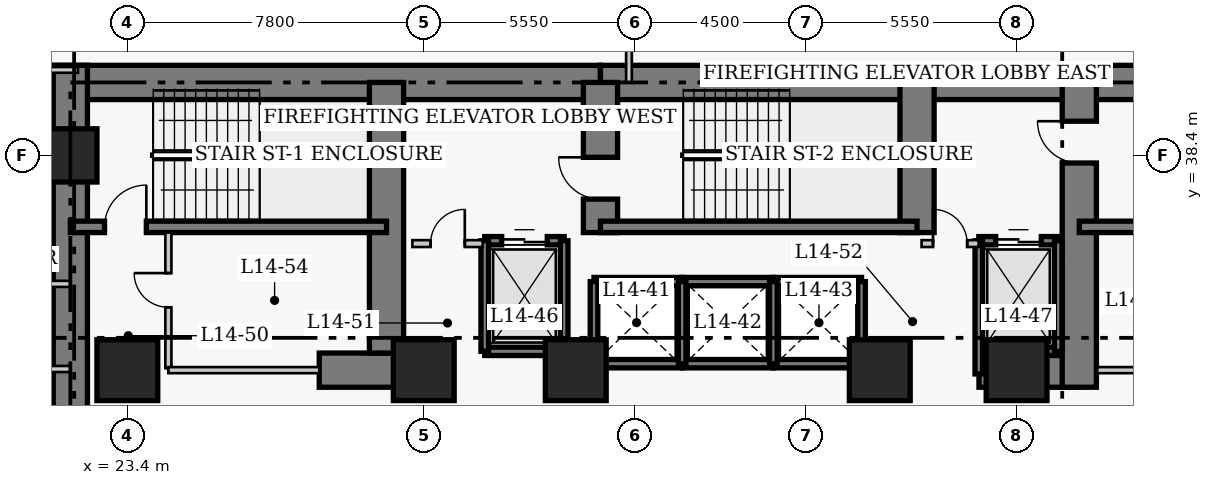
"""IFC4 building model, lengths in metres.
Left out: names, types, materials, properties, quantities, classifications, styles, units other than length and angle.
Written with IfcOpenShell. Run it as: python <this file> out.ifc"""

import sys

from ifc_helpers import new_model, si_unit, direction, frame, frame_2d, origin, origin_2d, place, context, subcontext, project, spatial, rectangle, extrude, element, fill, save


model = new_model("IFC4")
c1 = context("Model", 3, precision=1e-05, world=origin(), true_north=direction((0.0, 1.0)))
c2 = subcontext(c1, "Body", "Model", "MODEL_VIEW")
j1 = project(units=[si_unit("LENGTHUNIT", "METRE"), si_unit("PLANEANGLEUNIT", "RADIAN")], contexts=[c1])
p1 = place(None, origin())
s1 = spatial("IfcSite", under=j1, at=p1, CompositionType="ELEMENT")
p2 = place(p1, origin())
s2 = spatial("IfcBuilding", under=s1, at=p2, CompositionType="ELEMENT")
p3 = place(p2, frame((0.0, 0.0, 60.2)))
s3 = spatial("IfcBuildingStorey", under=s2, at=p3, CompositionType="ELEMENT", Elevation=60.2)
p4 = place(p3, frame((21.45, 40.32, 0.0), z_axis=(0.0, 0.0, 1.0), x_axis=(1.0, 0.0, 0.0)))
e1 = element("IfcWall", 1, at=p4, inside=s3, PredefinedType="SHEAR", context=c2, shape_type="SweptSolid", body=[
    extrude(rectangle(XDim=14.4, YDim=0.9, at=frame_2d((7.2, 0.0))), origin(), (0.0, 0.0, 1.0), 3.8),
])
p5 = place(p3, frame((35.85, 40.32, 0.0), z_axis=(0.0, 0.0, 1.0), x_axis=(1.0, 0.0, 0.0)))
e2 = element("IfcWall", 2, at=p5, inside=s3, PredefinedType="SHEAR", context=c2, shape_type="SweptSolid", body=[
    extrude(rectangle(XDim=12.6, YDim=0.9, at=frame_2d((6.3, 0.0))), origin(), (0.0, 0.0, 1.0), 3.8),
])
p6 = place(p3, frame((48.45, 40.32, 0.0), z_axis=(0.0, 0.0, 1.0), x_axis=(1.0, 0.0, 0.0)))
e3 = element("IfcWall", 3, at=p6, inside=s3, PredefinedType="SHEAR", context=c2, shape_type="SweptSolid", body=[
    extrude(rectangle(XDim=8.97, YDim=0.9, at=frame_2d((4.485, 0.0))), origin(), (0.0, 0.0, 1.0), 3.8),
])
p7 = place(p3, frame((21.9, 27.05, 0.0), z_axis=(0.0, 0.0, 1.0), x_axis=(0.0, 1.0, 0.0)))
e4 = element("IfcWall", 4, at=p7, inside=s3, PredefinedType="SHEAR", context=c2, shape_type="SweptSolid", body=[
    extrude(rectangle(XDim=13.72, YDim=0.9, at=frame_2d((6.86, 0.0))), origin(), (0.0, 0.0, 1.0), 3.8),
])
p8 = place(p3, frame((28.45, 32.75, 0.0), z_axis=(0.0, 0.0, 1.0), x_axis=(1.0, 0.0, 0.0)))
e5 = element("IfcWall", 5, at=p8, inside=s3, PredefinedType="SHEAR", context=c2, shape_type="SweptSolid", body=[
    extrude(rectangle(XDim=2.4, YDim=0.9, at=frame_2d((1.2, 0.0))), origin(), (0.0, 0.0, 1.0), 3.8),
])
p9 = place(p3, frame((45.81, 32.75, 0.0), z_axis=(0.0, 0.0, 1.0), x_axis=(1.0, 0.0, 0.0)))
e6 = element("IfcWall", 6, at=p9, inside=s3, PredefinedType="SHEAR", context=c2, shape_type="SweptSolid", body=[
    extrude(rectangle(XDim=2.64, YDim=0.9, at=frame_2d((1.32, 0.0))), origin(), (0.0, 0.0, 1.0), 3.8),
])
p10 = place(p3, frame((30.22, 33.2, 0.0), z_axis=(0.0, 0.0, 1.0), x_axis=(0.0, 1.0, 0.0)))
e7 = element("IfcWall", 7, at=p10, inside=s3, PredefinedType="SHEAR", context=c2, shape_type="SweptSolid", body=[
    extrude(rectangle(XDim=7.12, YDim=0.9, at=frame_2d((3.56, 0.0))), origin(), (0.0, 0.0, 1.0), 3.8),
])
p11 = place(p3, frame((35.85, 36.37, 0.0), z_axis=(0.0, 0.0, 1.0), x_axis=(0.0, 1.0, 0.0)))
e8 = element("IfcWall", 8, at=p11, inside=s3, PredefinedType="SHEAR", context=c2, shape_type="SweptSolid", body=[
    extrude(rectangle(XDim=3.95, YDim=0.9, at=frame_2d((1.975, 0.0))), origin(), (0.0, 0.0, 1.0), 3.8),
])
p12 = place(p11, frame((0.88, 0.0, 0.0)))
e9 = element("IfcOpeningElement", 9, at=p12, cuts=e8, PredefinedType="OPENING", context=c2, shape_type="SweptSolid", body=[
    extrude(rectangle(XDim=1.1, YDim=2.15, at=frame_2d((0.55, 1.075))), frame((0.0, 0.46, 0.0), z_axis=(0.0, -1.0, 0.0), x_axis=(1.0, 0.0, 0.0)), (0.0, 0.0, 1.0), 0.92),
])
p13 = place(p3, frame((44.18, 36.37, 0.0), z_axis=(0.0, 0.0, 1.0), x_axis=(0.0, 1.0, 0.0)))
e10 = element("IfcWall", 10, at=p13, inside=s3, PredefinedType="SHEAR", context=c2, shape_type="SweptSolid", body=[
    extrude(rectangle(XDim=3.95, YDim=0.9, at=frame_2d((1.975, 0.0))), origin(), (0.0, 0.0, 1.0), 3.8),
])
p14 = place(p3, frame((48.45, 32.3, 0.0), z_axis=(0.0, 0.0, 1.0), x_axis=(0.0, 1.0, 0.0)))
e11 = element("IfcWall", 11, at=p14, inside=s3, PredefinedType="SHEAR", context=c2, shape_type="SweptSolid", body=[
    extrude(rectangle(XDim=8.02, YDim=0.9, at=frame_2d((4.01, 0.0))), origin(), (0.0, 0.0, 1.0), 3.8),
])
p15 = place(p14, frame((5.9, 0.0, 0.0)))
e12 = element("IfcOpeningElement", 12, at=p15, cuts=e11, PredefinedType="OPENING", context=c2, shape_type="SweptSolid", body=[
    extrude(rectangle(XDim=1.1, YDim=2.15, at=frame_2d((0.55, 1.075))), frame((0.0, 0.46, 0.0), z_axis=(0.0, -1.0, 0.0), x_axis=(1.0, 0.0, 0.0)), (0.0, 0.0, 1.0), 0.92),
])
p16 = place(p3, frame((21.9, 36.52, 0.0), z_axis=(0.0, 0.0, 1.0), x_axis=(1.0, 0.0, 0.0)))
e13 = element("IfcWall", 13, at=p16, inside=s3, PredefinedType="SHEAR", context=c2, shape_type="SweptSolid", body=[
    extrude(rectangle(XDim=8.32, YDim=0.3, at=frame_2d((4.16, 0.0))), origin(), (0.0, 0.0, 1.0), 3.8),
])
p17 = place(p16, frame((0.9, 0.0, 0.0)))
e14 = element("IfcOpeningElement", 14, at=p17, cuts=e13, PredefinedType="OPENING", context=c2, shape_type="SweptSolid", body=[
    extrude(rectangle(XDim=1.1, YDim=2.15, at=frame_2d((0.55, 1.075))), frame((0.0, 0.16, 0.0), z_axis=(0.0, -1.0, 0.0), x_axis=(1.0, 0.0, 0.0)), (0.0, 0.0, 1.0), 0.32),
])
p18 = place(p3, frame((35.85, 36.52, 0.0), z_axis=(0.0, 0.0, 1.0), x_axis=(1.0, 0.0, 0.0)))
e15 = element("IfcWall", 15, at=p18, inside=s3, PredefinedType="SHEAR", context=c2, shape_type="SweptSolid", body=[
    extrude(rectangle(XDim=8.33, YDim=0.3, at=frame_2d((4.165, 0.0))), origin(), (0.0, 0.0, 1.0), 3.8),
])
p19 = place(p3, frame((48.45, 36.52, 0.0), z_axis=(0.0, 0.0, 1.0), x_axis=(1.0, 0.0, 0.0)))
e16 = element("IfcWall", 16, at=p19, inside=s3, PredefinedType="SHEAR", context=c2, shape_type="SweptSolid", body=[
    extrude(rectangle(XDim=8.52, YDim=0.3, at=frame_2d((4.26, 0.0))), origin(), (0.0, 0.0, 1.0), 3.8),
])
p20 = place(p3, frame((21.9, 38.4, 0.0), z_axis=(0.0, 0.0, 1.0), x_axis=(1.0, 0.0, 0.0)))
e17 = element("IfcColumn", 17, at=p20, inside=s3, PredefinedType="COLUMN", context=c2, shape_type="SweptSolid", body=[
    extrude(rectangle(XDim=1.4, YDim=1.4, at=origin_2d()), origin(), (0.0, 0.0, 1.0), 3.8),
])
for number, where, z_axis, x_axis in (
    (18, (23.4, 32.75, 0.0), (0.0, 0.0, 1.0), (1.0, 0.0, 0.0)),
    (19, (31.2, 32.75, 0.0), (0.0, 0.0, 1.0), (1.0, 0.0, 0.0)),
    (20, (35.2, 32.75, 0.0), (0.0, 0.0, 1.0), (1.0, 0.0, 0.0)),
    (21, (43.2, 32.75, 0.0), (0.0, 0.0, 1.0), (1.0, 0.0, 0.0)),
    (22, (46.8, 32.75, 0.0), (0.0, 0.0, 1.0), (1.0, 0.0, 0.0)),
):
    element("IfcColumn", number, at=place(p3, frame(where, z_axis=z_axis, x_axis=x_axis)), inside=s3, PredefinedType="COLUMN", context=c2, shape_type="SweptSolid", body=[
        extrude(rectangle(XDim=1.6, YDim=1.6, at=origin_2d()), origin(), (0.0, 0.0, 1.0), 3.8),
    ])
for number, where, z_axis, x_axis in (
    (23, (35.68, 35.08, 0.0), (0.0, 0.0, 1.0), (1.0, 0.0, 0.0)),
    (24, (35.68, 32.92, 0.0), (0.0, 0.0, 1.0), (1.0, 0.0, 0.0)),
):
    element("IfcWall", number, at=place(p3, frame(where, z_axis=z_axis, x_axis=x_axis)), inside=s3, PredefinedType="SHEAR", context=c2, shape_type="SweptSolid", body=[
        extrude(rectangle(XDim=2.32, YDim=0.22, at=frame_2d((1.16, 0.0))), origin(), (0.0, 0.0, 1.0), 3.8),
    ])
p21 = place(p3, frame((35.68, 32.92, 0.0), z_axis=(0.0, 0.0, 1.0), x_axis=(0.0, 1.0, 0.0)))
e25 = element("IfcWall", 25, at=p21, inside=s3, PredefinedType="SHEAR", context=c2, shape_type="SweptSolid", body=[
    extrude(rectangle(XDim=2.16, YDim=0.2, at=frame_2d((1.08, 0.0))), origin(), (0.0, 0.0, 1.0), 3.8),
])
for number, where, z_axis, x_axis in (
    (26, (38.0, 35.08, 0.0), (0.0, 0.0, 1.0), (1.0, 0.0, 0.0)),
    (27, (38.0, 32.92, 0.0), (0.0, 0.0, 1.0), (1.0, 0.0, 0.0)),
):
    element("IfcWall", number, at=place(p3, frame(where, z_axis=z_axis, x_axis=x_axis)), inside=s3, PredefinedType="SHEAR", context=c2, shape_type="SweptSolid", body=[
        extrude(rectangle(XDim=2.4, YDim=0.22, at=frame_2d((1.2, 0.0))), origin(), (0.0, 0.0, 1.0), 3.8),
    ])
p22 = place(p3, frame((38.0, 32.92, 0.0), z_axis=(0.0, 0.0, 1.0), x_axis=(0.0, 1.0, 0.0)))
e28 = element("IfcWall", 28, at=p22, inside=s3, PredefinedType="SHEAR", context=c2, shape_type="SweptSolid", body=[
    extrude(rectangle(XDim=2.16, YDim=0.2, at=frame_2d((1.08, 0.0))), origin(), (0.0, 0.0, 1.0), 3.8),
])
for number, where, z_axis, x_axis in (
    (29, (40.4, 35.08, 0.0), (0.0, 0.0, 1.0), (1.0, 0.0, 0.0)),
    (30, (40.4, 32.92, 0.0), (0.0, 0.0, 1.0), (1.0, 0.0, 0.0)),
):
    element("IfcWall", number, at=place(p3, frame(where, z_axis=z_axis, x_axis=x_axis)), inside=s3, PredefinedType="SHEAR", context=c2, shape_type="SweptSolid", body=[
        extrude(rectangle(XDim=2.32, YDim=0.22, at=frame_2d((1.16, 0.0))), origin(), (0.0, 0.0, 1.0), 3.8),
    ])
for number, where, z_axis, x_axis in (
    (31, (40.4, 32.92, 0.0), (0.0, 0.0, 1.0), (0.0, 1.0, 0.0)),
    (32, (42.72, 32.92, 0.0), (0.0, 0.0, 1.0), (0.0, 1.0, 0.0)),
):
    element("IfcWall", number, at=place(p3, frame(where, z_axis=z_axis, x_axis=x_axis)), inside=s3, PredefinedType="SHEAR", context=c2, shape_type="SweptSolid", body=[
        extrude(rectangle(XDim=2.16, YDim=0.2, at=frame_2d((1.08, 0.0))), origin(), (0.0, 0.0, 1.0), 3.8),
    ])
p23 = place(p3, frame((32.805, 36.155, 0.0), z_axis=(0.0, 0.0, 1.0), x_axis=(1.0, 0.0, 0.0)))
e33 = element("IfcWall", 33, at=p23, inside=s3, PredefinedType="SHEAR", context=c2, shape_type="SweptSolid", body=[
    extrude(rectangle(XDim=2.09, YDim=0.22, at=frame_2d((1.045, 0.0))), origin(), (0.0, 0.0, 1.0), 3.8),
])
p24 = place(p23, frame((0.445, 0.0, 0.0)))
e34 = element("IfcOpeningElement", 34, at=p24, cuts=e33, PredefinedType="OPENING", context=c2, shape_type="SweptSolid", body=[
    extrude(rectangle(XDim=1.2, YDim=2.15, at=frame_2d((0.6, 1.075))), frame((0.0, 0.12, 0.0), z_axis=(0.0, -1.0, 0.0), x_axis=(1.0, 0.0, 0.0)), (0.0, 0.0, 1.0), 0.24),
])
p25 = place(p3, frame((32.805, 33.245, 0.0), z_axis=(0.0, 0.0, 1.0), x_axis=(1.0, 0.0, 0.0)))
e35 = element("IfcWall", 35, at=p25, inside=s3, PredefinedType="SHEAR", context=c2, shape_type="SweptSolid", body=[
    extrude(rectangle(XDim=2.09, YDim=0.22, at=frame_2d((1.045, 0.0))), origin(), (0.0, 0.0, 1.0), 3.8),
])
for number, where, z_axis, x_axis in (
    (36, (32.805, 33.245, 0.0), (0.0, 0.0, 1.0), (0.0, 1.0, 0.0)),
    (37, (34.895, 33.245, 0.0), (0.0, 0.0, 1.0), (0.0, 1.0, 0.0)),
):
    element("IfcWall", number, at=place(p3, frame(where, z_axis=z_axis, x_axis=x_axis)), inside=s3, PredefinedType="SHEAR", context=c2, shape_type="SweptSolid", body=[
        extrude(rectangle(XDim=2.91, YDim=0.2, at=frame_2d((1.455, 0.0))), origin(), (0.0, 0.0, 1.0), 3.8),
    ])
p26 = place(p3, frame((45.805, 36.155, 0.0), z_axis=(0.0, 0.0, 1.0), x_axis=(1.0, 0.0, 0.0)))
e38 = element("IfcWall", 38, at=p26, inside=s3, PredefinedType="SHEAR", context=c2, shape_type="SweptSolid", body=[
    extrude(rectangle(XDim=2.09, YDim=0.22, at=frame_2d((1.045, 0.0))), origin(), (0.0, 0.0, 1.0), 3.8),
])
p27 = place(p26, frame((0.445, 0.0, 0.0)))
e39 = element("IfcOpeningElement", 39, at=p27, cuts=e38, PredefinedType="OPENING", context=c2, shape_type="SweptSolid", body=[
    extrude(rectangle(XDim=1.2, YDim=2.15, at=frame_2d((0.6, 1.075))), frame((0.0, 0.12, 0.0), z_axis=(0.0, -1.0, 0.0), x_axis=(1.0, 0.0, 0.0)), (0.0, 0.0, 1.0), 0.24),
])
p28 = place(p3, frame((45.805, 33.245, 0.0), z_axis=(0.0, 0.0, 1.0), x_axis=(1.0, 0.0, 0.0)))
e40 = element("IfcWall", 40, at=p28, inside=s3, PredefinedType="SHEAR", context=c2, shape_type="SweptSolid", body=[
    extrude(rectangle(XDim=2.09, YDim=0.22, at=frame_2d((1.045, 0.0))), origin(), (0.0, 0.0, 1.0), 3.8),
])
p29 = place(p3, frame((45.805, 32.65, 0.0), z_axis=(0.0, 0.0, 1.0), x_axis=(0.0, 1.0, 0.0)))
e41 = element("IfcWall", 41, at=p29, inside=s3, PredefinedType="SHEAR", context=c2, shape_type="SweptSolid", body=[
    extrude(rectangle(XDim=3.505, YDim=0.2, at=frame_2d((1.752, 0.0))), origin(), (0.0, 0.0, 1.0), 3.8),
])
p30 = place(p3, frame((47.895, 33.245, 0.0), z_axis=(0.0, 0.0, 1.0), x_axis=(0.0, 1.0, 0.0)))
e42 = element("IfcWall", 42, at=p30, inside=s3, PredefinedType="SHEAR", context=c2, shape_type="SweptSolid", body=[
    extrude(rectangle(XDim=2.91, YDim=0.2, at=frame_2d((1.455, 0.0))), origin(), (0.0, 0.0, 1.0), 3.8),
])
p31 = place(p3, frame((30.9, 36.08, 0.0), z_axis=(0.0, 0.0, 1.0), x_axis=(1.0, 0.0, 0.0)))
e43 = element("IfcWall", 43, at=p31, inside=s3, PredefinedType="PARTITIONING", context=c2, shape_type="SweptSolid", body=[
    extrude(rectangle(XDim=1.85, YDim=0.18, at=frame_2d((0.925, 0.0))), origin(), (0.0, 0.0, 1.0), 3.54),
])
p32 = place(p31, frame((0.48, 0.0, 0.0)))
e44 = element("IfcOpeningElement", 44, at=p32, cuts=e43, PredefinedType="OPENING", context=c2, shape_type="SweptSolid", body=[
    extrude(rectangle(XDim=0.9, YDim=2.15, at=frame_2d((0.45, 1.075))), frame((0.0, 0.1, 0.0), z_axis=(0.0, -1.0, 0.0), x_axis=(1.0, 0.0, 0.0)), (0.0, 0.0, 1.0), 0.2),
])
p33 = place(p3, frame((44.3, 36.08, 0.0), z_axis=(0.0, 0.0, 1.0), x_axis=(1.0, 0.0, 0.0)))
e45 = element("IfcWall", 45, at=p33, inside=s3, PredefinedType="PARTITIONING", context=c2, shape_type="SweptSolid", body=[
    extrude(rectangle(XDim=1.5, YDim=0.18, at=frame_2d((0.75, 0.0))), origin(), (0.0, 0.0, 1.0), 3.54),
])
p34 = place(p33, frame((0.3, 0.0, 0.0)))
e46 = element("IfcOpeningElement", 46, at=p34, cuts=e45, PredefinedType="OPENING", context=c2, shape_type="SweptSolid", body=[
    extrude(rectangle(XDim=0.9, YDim=2.15, at=frame_2d((0.45, 1.075))), frame((0.0, 0.1, 0.0), z_axis=(0.0, -1.0, 0.0), x_axis=(1.0, 0.0, 0.0)), (0.0, 0.0, 1.0), 0.2),
])
p35 = place(p3, frame((24.48, 32.8, 0.0), z_axis=(0.0, 0.0, 1.0), x_axis=(0.0, 1.0, 0.0)))
e47 = element("IfcWall", 47, at=p35, inside=s3, PredefinedType="PARTITIONING", context=c2, shape_type="SweptSolid", body=[
    extrude(rectangle(XDim=3.57, YDim=0.16, at=frame_2d((1.785, 0.0))), origin(), (0.0, 0.0, 1.0), 3.54),
])
p36 = place(p35, frame((1.604, 0.0, 0.0)))
e48 = element("IfcOpeningElement", 48, at=p36, cuts=e47, PredefinedType="OPENING", context=c2, shape_type="SweptSolid", body=[
    extrude(rectangle(XDim=0.9, YDim=2.1, at=frame_2d((0.45, 1.05))), frame((0.0, 0.09, 0.0), z_axis=(0.0, -1.0, 0.0), x_axis=(1.0, 0.0, 0.0)), (0.0, 0.0, 1.0), 0.18),
])
p37 = place(p3, frame((24.48, 32.75, 0.0), z_axis=(0.0, 0.0, 1.0), x_axis=(1.0, 0.0, 0.0)))
e49 = element("IfcWall", 49, at=p37, inside=s3, PredefinedType="PARTITIONING", context=c2, shape_type="SweptSolid", body=[
    extrude(rectangle(XDim=3.97, YDim=0.16, at=frame_2d((1.985, 0.0))), origin(), (0.0, 0.0, 1.0), 3.54),
])
p38 = place(p3, frame((48.92, 32.75, 0.0), z_axis=(0.0, 0.0, 1.0), x_axis=(1.0, 0.0, 0.0)))
e50 = element("IfcWall", 50, at=p38, inside=s3, PredefinedType="PARTITIONING", context=c2, shape_type="SweptSolid", body=[
    extrude(rectangle(XDim=2.2, YDim=0.16, at=frame_2d((1.1, 0.0))), origin(), (0.0, 0.0, 1.0), 3.54),
])
for number, where, z_axis, x_axis in (
    (51, (20.46, 35.02, 0.0), (0.0, 0.0, 1.0), (1.0, 0.0, 0.0)),
    (52, (20.46, 32.78, 0.0), (0.0, 0.0, 1.0), (1.0, 0.0, 0.0)),
):
    element("IfcWall", number, at=place(p3, frame(where, z_axis=z_axis, x_axis=x_axis)), inside=s3, PredefinedType="PARTITIONING", context=c2, shape_type="SweptSolid", body=[
        extrude(rectangle(XDim=1.44, YDim=0.16, at=frame_2d((0.72, 0.0))), origin(), (0.0, 0.0, 1.0), 3.54),
    ])
p39 = place(p3, frame((18.24, 40.65, 0.0), z_axis=(0.0, 0.0, 1.0), x_axis=(1.0, 0.0, 0.0)))
e53 = element("IfcWall", 53, at=p39, inside=s3, PredefinedType="PARTITIONING", context=c2, shape_type="SweptSolid", body=[
    extrude(rectangle(XDim=3.86, YDim=0.15, at=frame_2d((1.93, 0.0))), origin(), (0.0, 0.0, 1.0), 3.54),
])
p40 = place(p39, frame((0.55, 0.0, 0.0)))
e54 = element("IfcOpeningElement", 54, at=p40, cuts=e53, PredefinedType="OPENING", context=c2, shape_type="SweptSolid", body=[
    extrude(rectangle(XDim=1.0, YDim=2.15, at=frame_2d((0.5, 1.075))), frame((0.0, 0.085, 0.0), z_axis=(0.0, -1.0, 0.0), x_axis=(1.0, 0.0, 0.0)), (0.0, 0.0, 1.0), 0.17),
])
p41 = place(p3, frame((36.6, 40.32, 0.0), z_axis=(0.0, 0.0, 1.0), x_axis=(0.0, 1.0, 0.0)))
e55 = element("IfcWall", 55, at=p41, inside=s3, PredefinedType="PARTITIONING", context=c2, shape_type="SweptSolid", body=[
    extrude(rectangle(XDim=5.045, YDim=0.15, at=frame_2d((2.522, 0.0))), origin(), (0.0, 0.0, 1.0), 3.54),
])
p42 = place(p24, origin())
e56 = element("IfcDoor", 56, at=p42, inside=s3, OperationType="DOUBLE_DOOR_SLIDING", PredefinedType="DOOR", context=c2, shape_type="SweptSolid", body=[
    extrude(rectangle(XDim=1.2, YDim=2.15, at=frame_2d((0.6, 1.075))), frame((0.0, 0.025, 0.0), z_axis=(0.0, -1.0, 0.0), x_axis=(1.0, 0.0, 0.0)), (0.0, 0.0, 1.0), 0.05),
])
fill(e34, e56)
p43 = place(p27, origin())
e57 = element("IfcDoor", 57, at=p43, inside=s3, OperationType="DOUBLE_DOOR_SLIDING", PredefinedType="DOOR", context=c2, shape_type="SweptSolid", body=[
    extrude(rectangle(XDim=1.2, YDim=2.15, at=frame_2d((0.6, 1.075))), frame((0.0, 0.025, 0.0), z_axis=(0.0, -1.0, 0.0), x_axis=(1.0, 0.0, 0.0)), (0.0, 0.0, 1.0), 0.05),
])
fill(e39, e57)
p44 = place(p32, origin())
e58 = element("IfcDoor", 58, at=p44, inside=s3, OperationType="SINGLE_SWING_RIGHT", PredefinedType="DOOR", context=c2, shape_type="SweptSolid", body=[
    extrude(rectangle(XDim=0.9, YDim=2.15, at=frame_2d((0.45, 1.075))), frame((0.0, 0.025, 0.0), z_axis=(0.0, -1.0, 0.0), x_axis=(1.0, 0.0, 0.0)), (0.0, 0.0, 1.0), 0.05),
])
fill(e44, e58)
p45 = place(p34, origin())
e59 = element("IfcDoor", 59, at=p45, inside=s3, OperationType="SINGLE_SWING_LEFT", PredefinedType="DOOR", context=c2, shape_type="SweptSolid", body=[
    extrude(rectangle(XDim=0.9, YDim=2.15, at=frame_2d((0.45, 1.075))), frame((0.0, 0.025, 0.0), z_axis=(0.0, -1.0, 0.0), x_axis=(1.0, 0.0, 0.0)), (0.0, 0.0, 1.0), 0.05),
])
fill(e46, e59)
p46 = place(p36, origin())
e60 = element("IfcDoor", 60, at=p46, inside=s3, OperationType="SINGLE_SWING_RIGHT", PredefinedType="DOOR", context=c2, shape_type="SweptSolid", body=[
    extrude(rectangle(XDim=0.9, YDim=2.1, at=frame_2d((0.45, 1.05))), frame((0.0, 0.025, 0.0), z_axis=(0.0, -1.0, 0.0), x_axis=(1.0, 0.0, 0.0)), (0.0, 0.0, 1.0), 0.05),
])
fill(e48, e60)
p47 = place(p17, origin())
e61 = element("IfcDoor", 61, at=p47, inside=s3, OperationType="SINGLE_SWING_RIGHT", PredefinedType="DOOR", context=c2, shape_type="SweptSolid", body=[
    extrude(rectangle(XDim=1.1, YDim=2.15, at=frame_2d((0.55, 1.075))), frame((0.0, 0.025, 0.0), z_axis=(0.0, -1.0, 0.0), x_axis=(1.0, 0.0, 0.0)), (0.0, 0.0, 1.0), 0.05),
])
fill(e14, e61)
p48 = place(p12, origin())
e62 = element("IfcDoor", 62, at=p48, inside=s3, OperationType="SINGLE_SWING_RIGHT", PredefinedType="DOOR", context=c2, shape_type="SweptSolid", body=[
    extrude(rectangle(XDim=1.1, YDim=2.15, at=frame_2d((0.55, 1.075))), frame((0.0, 0.025, 0.0), z_axis=(0.0, -1.0, 0.0), x_axis=(1.0, 0.0, 0.0)), (0.0, 0.0, 1.0), 0.05),
])
fill(e9, e62)
p49 = place(p15, origin())
e63 = element("IfcDoor", 63, at=p49, inside=s3, OperationType="SINGLE_SWING_RIGHT", PredefinedType="DOOR", context=c2, shape_type="SweptSolid", body=[
    extrude(rectangle(XDim=1.1, YDim=2.15, at=frame_2d((0.55, 1.075))), frame((0.0, 0.025, 0.0), z_axis=(0.0, -1.0, 0.0), x_axis=(1.0, 0.0, 0.0)), (0.0, 0.0, 1.0), 0.05),
])
fill(e12, e63)
save(model, sys.argv[1])
